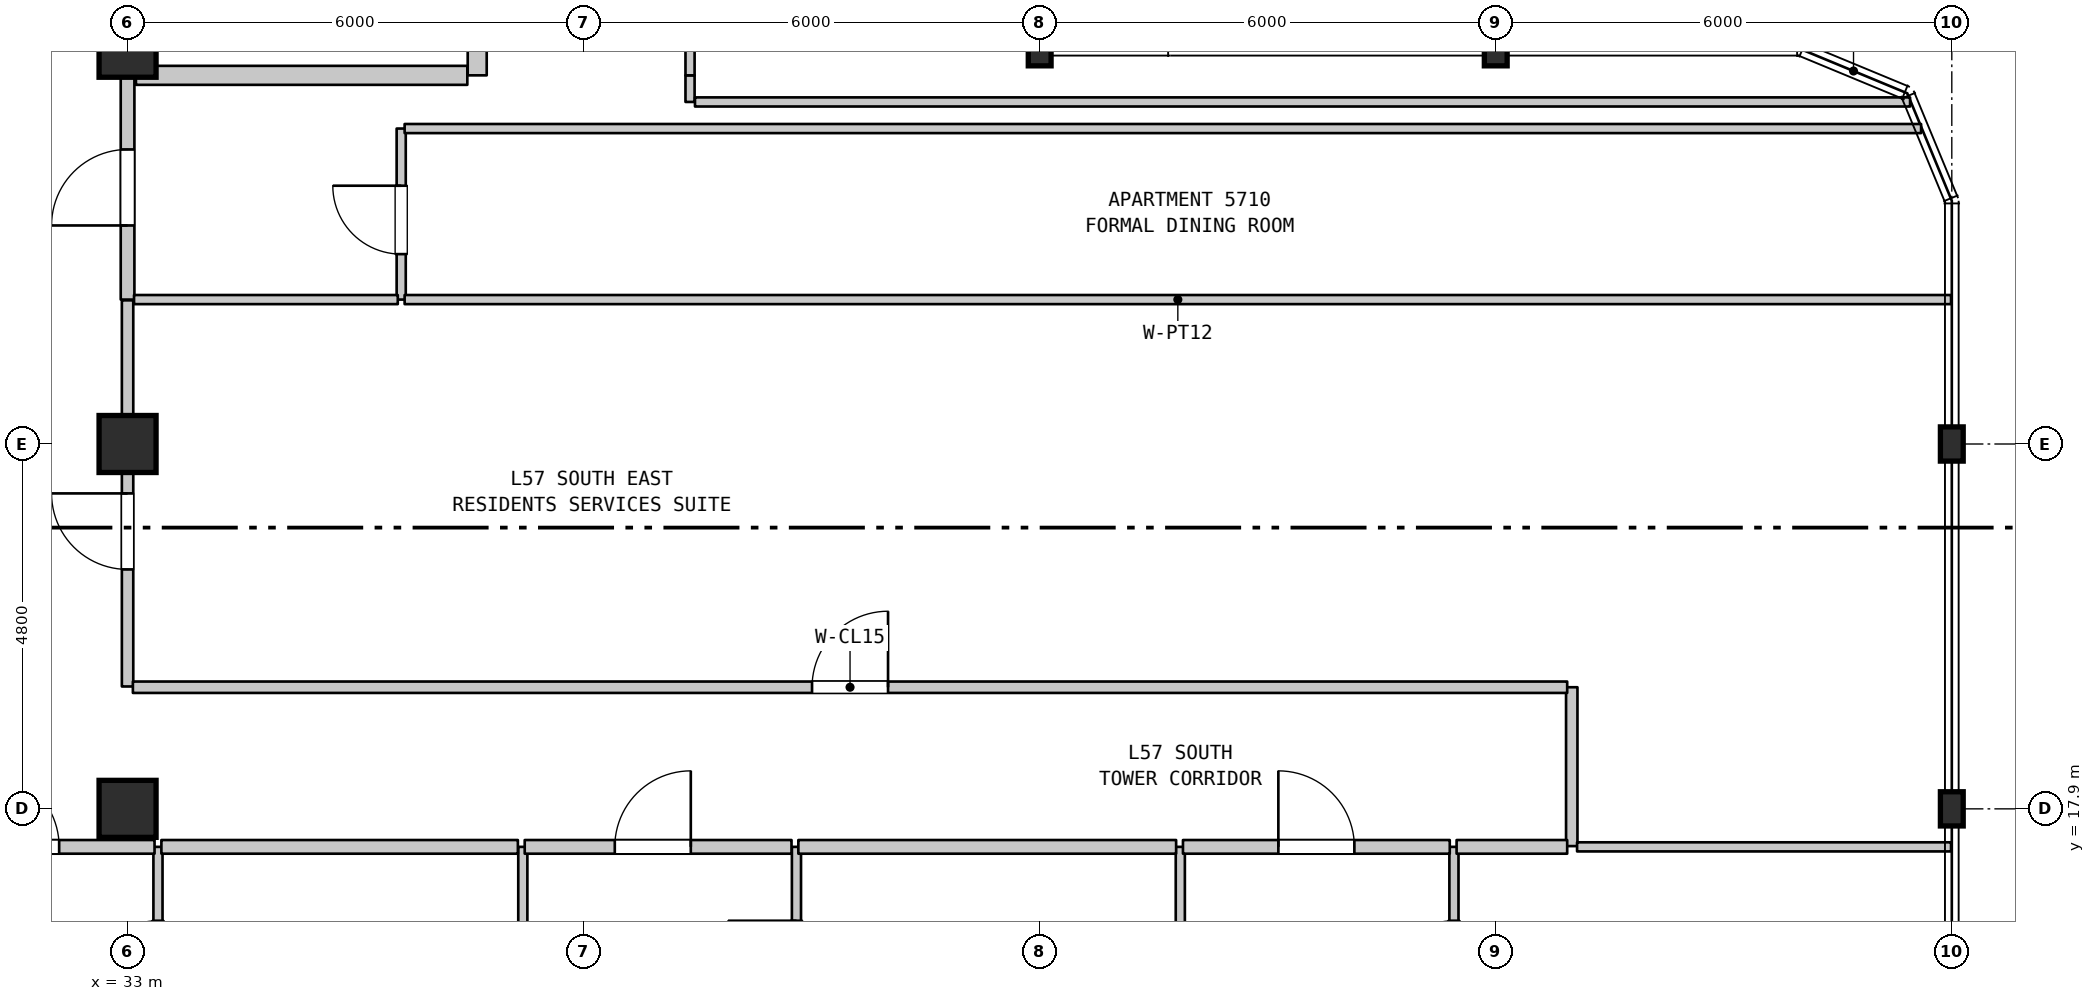
"""IFC4 building model, lengths in metres.
Left out: names, types, materials, properties, quantities, classifications, styles, units other than length and angle.
Written with IfcOpenShell. Run it as: python <this file> out.ifc"""

import sys

from ifc_helpers import new_model, si_unit, direction, frame, frame_2d, origin, origin_2d, place, context, subcontext, project, spatial, rectangle, i_section, extrude, element, fill, save


model = new_model("IFC4")
c1 = context("Model", 3, precision=1e-05, world=origin(), true_north=direction((0.0, 1.0)))
c2 = subcontext(c1, "Body", "Model", "MODEL_VIEW")
j1 = project(units=[si_unit("LENGTHUNIT", "METRE"), si_unit("PLANEANGLEUNIT", "RADIAN")], contexts=[c1])
p1 = place(None, origin())
s1 = spatial("IfcSite", under=j1, at=p1, CompositionType="ELEMENT")
p2 = place(p1, origin())
s2 = spatial("IfcBuilding", under=s1, at=p2, CompositionType="ELEMENT")
p3 = place(p2, frame((0.0, 0.0, 230.2)))
s3 = spatial("IfcBuildingStorey", under=s2, at=p3, CompositionType="ELEMENT", Elevation=230.2)
for number, where, z_axis, x_axis in (
    (1, (33.0, 17.9, 0.0), (0.0, 0.0, 1.0), (1.0, 0.0, 0.0)),
    (2, (33.0, 22.7, 0.0), (0.0, 0.0, 1.0), (1.0, 0.0, 0.0)),
    (3, (33.0, 27.9, 0.0), (0.0, 0.0, 1.0), (1.0, 0.0, 0.0)),
):
    element("IfcColumn", number, at=place(p3, frame(where, z_axis=z_axis, x_axis=x_axis)), inside=s3, PredefinedType="COLUMN", context=c2, shape_type="SweptSolid", body=[
        extrude(rectangle(XDim=0.75, YDim=0.75, at=origin_2d()), origin(), (0.0, 0.0, 1.0), 3.7),
    ])
for number, where, z_axis, x_axis in (
    (4, (45.0, 27.9, 0.0), (0.0, 0.0, 1.0), (1.0, 0.0, 0.0)),
    (5, (51.0, 27.9, 0.0), (0.0, 0.0, 1.0), (1.0, 0.0, 0.0)),
    (6, (57.0, 17.9, 0.0), (0.0, 0.0, 1.0), (1.0, 0.0, 0.0)),
    (7, (57.0, 22.7, 0.0), (0.0, 0.0, 1.0), (1.0, 0.0, 0.0)),
):
    element("IfcColumn", number, at=place(p3, frame(where, z_axis=z_axis, x_axis=x_axis)), inside=s3, PredefinedType="COLUMN", context=c2, shape_type="SweptSolid", body=[
        extrude(i_section(OverallWidth=0.3, OverallDepth=0.45, WebThickness=0.014, FlangeThickness=0.026, FilletRadius=0.027, at=origin_2d()), origin(), (0.0, 0.0, 1.0), 3.7),
    ])
p4 = place(p3, frame((33.0, 19.51, 0.0), z_axis=(0.0, 0.0, 1.0), x_axis=(0.0, 1.0, 0.0)))
e8 = element("IfcWall", 8, at=p4, inside=s3, PredefinedType="STANDARD", context=c2, shape_type="SweptSolid", body=[
    extrude(rectangle(XDim=5.08, YDim=0.15, at=frame_2d((2.54, 0.0))), origin(), (0.0, 0.0, 1.0), 2.99),
])
p5 = place(p4, frame((1.54, 0.0, 0.0)))
e9 = element("IfcOpeningElement", 9, at=p5, cuts=e8, PredefinedType="OPENING", context=c2, shape_type="SweptSolid", body=[
    extrude(rectangle(XDim=1.0, YDim=2.15, at=frame_2d((0.5, 1.075))), frame((0.0, 0.085, 0.0), z_axis=(0.0, -1.0, 0.0), x_axis=(1.0, 0.0, 0.0)), (0.0, 0.0, 1.0), 0.17),
])
p6 = place(p3, frame((33.0, 24.6, 0.0), z_axis=(0.0, 0.0, 1.0), x_axis=(0.0, 1.0, 0.0)))
e10 = element("IfcWall", 10, at=p6, inside=s3, PredefinedType="STANDARD", context=c2, shape_type="SweptSolid", body=[
    extrude(rectangle(XDim=2.95, YDim=0.18, at=frame_2d((1.475, 0.0))), origin(), (0.0, 0.0, 1.0), 2.99),
])
p7 = place(p6, frame((0.975, 0.0, 0.0)))
e11 = element("IfcOpeningElement", 11, at=p7, cuts=e10, PredefinedType="OPENING", context=c2, shape_type="SweptSolid", body=[
    extrude(rectangle(XDim=1.0, YDim=2.15, at=frame_2d((0.5, 1.075))), frame((0.0, 0.1, 0.0), z_axis=(0.0, -1.0, 0.0), x_axis=(1.0, 0.0, 0.0)), (0.0, 0.0, 1.0), 0.2),
])
p8 = place(p3, frame((33.0, 27.55, 0.0), z_axis=(0.0, 0.0, 1.0), x_axis=(0.0, 1.0, 0.0)))
e12 = element("IfcWall", 12, at=p8, inside=s3, PredefinedType="STANDARD", context=c2, shape_type="SweptSolid", body=[
    extrude(rectangle(XDim=4.636, YDim=0.25, at=frame_2d((2.318, 0.0))), origin(), (0.0, 0.0, 1.0), 2.89),
])
p9 = place(p3, frame((33.4, 14.7, 0.0), z_axis=(0.0, 0.0, 1.0), x_axis=(0.0, 1.0, 0.0)))
e13 = element("IfcWall", 13, at=p9, inside=s3, PredefinedType="PARTITIONING", context=c2, shape_type="SweptSolid", body=[
    extrude(rectangle(XDim=2.7, YDim=0.12, at=frame_2d((1.35, 0.0))), origin(), (0.0, 0.0, 1.0), 3.39),
])
p10 = place(p9, frame((0.828, 0.0, 0.0)))
e14 = element("IfcOpeningElement", 14, at=p10, cuts=e13, PredefinedType="OPENING", context=c2, shape_type="SweptSolid", body=[
    extrude(rectangle(XDim=0.9, YDim=2.1, at=frame_2d((0.45, 1.05))), frame((0.0, 0.07, 0.0), z_axis=(0.0, -1.0, 0.0), x_axis=(1.0, 0.0, 0.0)), (0.0, 0.0, 1.0), 0.14),
])
p11 = place(p3, frame((36.6, 24.6, 0.0), z_axis=(0.0, 0.0, 1.0), x_axis=(0.0, 1.0, 0.0)))
e15 = element("IfcWall", 15, at=p11, inside=s3, PredefinedType="PARTITIONING", context=c2, shape_type="SweptSolid", body=[
    extrude(rectangle(XDim=2.25, YDim=0.12, at=frame_2d((1.125, 0.0))), origin(), (0.0, 0.0, 1.0), 3.39),
])
p12 = place(p11, frame((0.598, 0.0, 0.0)))
e16 = element("IfcOpeningElement", 16, at=p12, cuts=e15, PredefinedType="OPENING", context=c2, shape_type="SweptSolid", body=[
    extrude(rectangle(XDim=0.9, YDim=2.15, at=frame_2d((0.45, 1.075))), frame((0.0, 0.07, 0.0), z_axis=(0.0, -1.0, 0.0), x_axis=(1.0, 0.0, 0.0)), (0.0, 0.0, 1.0), 0.14),
])
p13 = place(p3, frame((37.6, 27.55, 0.0), z_axis=(0.0, 0.0, 1.0), x_axis=(0.0, 1.0, 0.0)))
e17 = element("IfcWall", 17, at=p13, inside=s3, PredefinedType="STANDARD", context=c2, shape_type="SweptSolid", body=[
    extrude(rectangle(XDim=4.636, YDim=0.25, at=frame_2d((2.318, 0.0))), origin(), (0.0, 0.0, 1.0), 3.39),
])
p14 = place(p13, frame((1.843, 0.0, 0.0)))
e18 = element("IfcOpeningElement", 18, at=p14, cuts=e17, PredefinedType="OPENING", context=c2, shape_type="SweptSolid", body=[
    extrude(rectangle(XDim=0.95, YDim=2.15, at=frame_2d((0.475, 1.075))), frame((0.0, 0.135, 0.0), z_axis=(0.0, -1.0, 0.0), x_axis=(1.0, 0.0, 0.0)), (0.0, 0.0, 1.0), 0.27),
])
p15 = place(p3, frame((38.2, 14.7, 0.0), z_axis=(0.0, 0.0, 1.0), x_axis=(0.0, 1.0, 0.0)))
e19 = element("IfcWall", 19, at=p15, inside=s3, PredefinedType="PARTITIONING", context=c2, shape_type="SweptSolid", body=[
    extrude(rectangle(XDim=2.7, YDim=0.12, at=frame_2d((1.35, 0.0))), origin(), (0.0, 0.0, 1.0), 3.39),
])
p16 = place(p3, frame((40.4, 27.2, 0.0), z_axis=(0.0, 0.0, 1.0), x_axis=(0.0, 1.0, 0.0)))
e20 = element("IfcWall", 20, at=p16, inside=s3, PredefinedType="PARTITIONING", context=c2, shape_type="SweptSolid", body=[
    extrude(rectangle(XDim=0.35, YDim=0.12, at=frame_2d((0.175, 0.0))), origin(), (0.0, 0.0, 1.0), 3.39),
])
p17 = place(p3, frame((40.4, 27.55, 0.0), z_axis=(0.0, 0.0, 1.0), x_axis=(0.0, 1.0, 0.0)))
e21 = element("IfcWall", 21, at=p17, inside=s3, PredefinedType="PARTITIONING", context=c2, shape_type="SweptSolid", body=[
    extrude(rectangle(XDim=12.2, YDim=0.12, at=frame_2d((6.1, 0.0))), origin(), (0.0, 0.0, 1.0), 3.39),
])
p18 = place(p17, frame((1.758, 0.0, 0.0)))
e22 = element("IfcOpeningElement", 22, at=p18, cuts=e21, PredefinedType="OPENING", context=c2, shape_type="SweptSolid", body=[
    extrude(rectangle(XDim=0.9, YDim=2.15, at=frame_2d((0.45, 1.075))), frame((0.0, 0.07, 0.0), z_axis=(0.0, -1.0, 0.0), x_axis=(1.0, 0.0, 0.0)), (0.0, 0.0, 1.0), 0.14),
])
p19 = place(p17, frame((5.579, 0.0, 0.0)))
e23 = element("IfcOpeningElement", 23, at=p19, cuts=e21, PredefinedType="OPENING", context=c2, shape_type="SweptSolid", body=[
    extrude(rectangle(XDim=0.9, YDim=2.15, at=frame_2d((0.45, 1.075))), frame((0.0, 0.07, 0.0), z_axis=(0.0, -1.0, 0.0), x_axis=(1.0, 0.0, 0.0)), (0.0, 0.0, 1.0), 0.14),
])
p20 = place(p17, frame((9.541, 0.0, 0.0)))
e24 = element("IfcOpeningElement", 24, at=p20, cuts=e21, PredefinedType="OPENING", context=c2, shape_type="SweptSolid", body=[
    extrude(rectangle(XDim=0.9, YDim=2.15, at=frame_2d((0.45, 1.075))), frame((0.0, 0.07, 0.0), z_axis=(0.0, -1.0, 0.0), x_axis=(1.0, 0.0, 0.0)), (0.0, 0.0, 1.0), 0.14),
])
p21 = place(p3, frame((41.8, 14.7, 0.0), z_axis=(0.0, 0.0, 1.0), x_axis=(0.0, 1.0, 0.0)))
e25 = element("IfcWall", 25, at=p21, inside=s3, PredefinedType="PARTITIONING", context=c2, shape_type="SweptSolid", body=[
    extrude(rectangle(XDim=2.7, YDim=0.12, at=frame_2d((1.35, 0.0))), origin(), (0.0, 0.0, 1.0), 3.39),
])
p22 = place(p21, frame((0.828, 0.0, 0.0)))
e26 = element("IfcOpeningElement", 26, at=p22, cuts=e25, PredefinedType="OPENING", context=c2, shape_type="SweptSolid", body=[
    extrude(rectangle(XDim=0.9, YDim=2.1, at=frame_2d((0.45, 1.05))), frame((0.0, 0.07, 0.0), z_axis=(0.0, -1.0, 0.0), x_axis=(1.0, 0.0, 0.0)), (0.0, 0.0, 1.0), 0.14),
])
p23 = place(p3, frame((46.85, 14.7, 0.0), z_axis=(0.0, 0.0, 1.0), x_axis=(0.0, 1.0, 0.0)))
e27 = element("IfcWall", 27, at=p23, inside=s3, PredefinedType="PARTITIONING", context=c2, shape_type="SweptSolid", body=[
    extrude(rectangle(XDim=2.7, YDim=0.12, at=frame_2d((1.35, 0.0))), origin(), (0.0, 0.0, 1.0), 3.39),
])
p24 = place(p3, frame((50.45, 14.7, 0.0), z_axis=(0.0, 0.0, 1.0), x_axis=(0.0, 1.0, 0.0)))
e28 = element("IfcWall", 28, at=p24, inside=s3, PredefinedType="PARTITIONING", context=c2, shape_type="SweptSolid", body=[
    extrude(rectangle(XDim=2.7, YDim=0.12, at=frame_2d((1.35, 0.0))), origin(), (0.0, 0.0, 1.0), 3.39),
])
p25 = place(p24, frame((0.828, 0.0, 0.0)))
e29 = element("IfcOpeningElement", 29, at=p25, cuts=e28, PredefinedType="OPENING", context=c2, shape_type="SweptSolid", body=[
    extrude(rectangle(XDim=0.9, YDim=2.1, at=frame_2d((0.45, 1.05))), frame((0.0, 0.07, 0.0), z_axis=(0.0, -1.0, 0.0), x_axis=(1.0, 0.0, 0.0)), (0.0, 0.0, 1.0), 0.14),
])
p26 = place(p3, frame((52.0, 17.41, 0.0), z_axis=(0.0, 0.0, 1.0), x_axis=(0.0, 1.0, 0.0)))
e30 = element("IfcWall", 30, at=p26, inside=s3, PredefinedType="STANDARD", context=c2, shape_type="SweptSolid", body=[
    extrude(rectangle(XDim=2.09, YDim=0.15, at=frame_2d((1.045, 0.0))), origin(), (0.0, 0.0, 1.0), 3.39),
])
p27 = place(p3, frame((29.845, 17.4, 0.0), z_axis=(0.0, 0.0, 1.0), x_axis=(1.0, 0.0, 0.0)))
e31 = element("IfcWall", 31, at=p27, inside=s3, PredefinedType="STANDARD", context=c2, shape_type="SweptSolid", body=[
    extrude(rectangle(XDim=3.51, YDim=0.18, at=frame_2d((1.755, 0.0))), origin(), (0.0, 0.0, 1.0), 3.39),
])
p28 = place(p27, frame((1.255, 0.0, 0.0)))
e32 = element("IfcOpeningElement", 32, at=p28, cuts=e31, PredefinedType="OPENING", context=c2, shape_type="SweptSolid", body=[
    extrude(rectangle(XDim=1.0, YDim=2.15, at=frame_2d((0.5, 1.075))), frame((0.0, 0.1, 0.0), z_axis=(0.0, -1.0, 0.0), x_axis=(1.0, 0.0, 0.0)), (0.0, 0.0, 1.0), 0.2),
])
p29 = place(p3, frame((33.445, 17.4, 0.0), z_axis=(0.0, 0.0, 1.0), x_axis=(1.0, 0.0, 0.0)))
e33 = element("IfcWall", 33, at=p29, inside=s3, PredefinedType="STANDARD", context=c2, shape_type="SweptSolid", body=[
    extrude(rectangle(XDim=4.69, YDim=0.18, at=frame_2d((2.345, 0.0))), origin(), (0.0, 0.0, 1.0), 3.39),
])
p30 = place(p3, frame((38.225, 17.4, 0.0), z_axis=(0.0, 0.0, 1.0), x_axis=(1.0, 0.0, 0.0)))
e34 = element("IfcWall", 34, at=p30, inside=s3, PredefinedType="STANDARD", context=c2, shape_type="SweptSolid", body=[
    extrude(rectangle(XDim=3.51, YDim=0.18, at=frame_2d((1.755, 0.0))), origin(), (0.0, 0.0, 1.0), 3.39),
])
p31 = place(p30, frame((1.185, 0.0, 0.0)))
e35 = element("IfcOpeningElement", 35, at=p31, cuts=e34, PredefinedType="OPENING", context=c2, shape_type="SweptSolid", body=[
    extrude(rectangle(XDim=1.0, YDim=2.15, at=frame_2d((0.5, 1.075))), frame((0.0, 0.1, 0.0), z_axis=(0.0, -1.0, 0.0), x_axis=(1.0, 0.0, 0.0)), (0.0, 0.0, 1.0), 0.2),
])
p32 = place(p3, frame((41.825, 17.4, 0.0), z_axis=(0.0, 0.0, 1.0), x_axis=(1.0, 0.0, 0.0)))
e36 = element("IfcWall", 36, at=p32, inside=s3, PredefinedType="STANDARD", context=c2, shape_type="SweptSolid", body=[
    extrude(rectangle(XDim=4.97, YDim=0.18, at=frame_2d((2.485, 0.0))), origin(), (0.0, 0.0, 1.0), 3.39),
])
p33 = place(p3, frame((46.885, 17.4, 0.0), z_axis=(0.0, 0.0, 1.0), x_axis=(1.0, 0.0, 0.0)))
e37 = element("IfcWall", 37, at=p33, inside=s3, PredefinedType="STANDARD", context=c2, shape_type="SweptSolid", body=[
    extrude(rectangle(XDim=3.51, YDim=0.18, at=frame_2d((1.755, 0.0))), origin(), (0.0, 0.0, 1.0), 3.39),
])
p34 = place(p33, frame((1.255, 0.0, 0.0)))
e38 = element("IfcOpeningElement", 38, at=p34, cuts=e37, PredefinedType="OPENING", context=c2, shape_type="SweptSolid", body=[
    extrude(rectangle(XDim=1.0, YDim=2.15, at=frame_2d((0.5, 1.075))), frame((0.0, 0.1, 0.0), z_axis=(0.0, -1.0, 0.0), x_axis=(1.0, 0.0, 0.0)), (0.0, 0.0, 1.0), 0.2),
])
p35 = place(p3, frame((50.485, 17.4, 0.0), z_axis=(0.0, 0.0, 1.0), x_axis=(1.0, 0.0, 0.0)))
e39 = element("IfcWall", 39, at=p35, inside=s3, PredefinedType="STANDARD", context=c2, shape_type="SweptSolid", body=[
    extrude(rectangle(XDim=1.455, YDim=0.18, at=frame_2d((0.728, 0.0))), origin(), (0.0, 0.0, 1.0), 3.39),
])
p36 = place(p3, frame((52.07, 17.4, 0.0), z_axis=(0.0, 0.0, 1.0), x_axis=(1.0, 0.0, 0.0)))
e40 = element("IfcWall", 40, at=p36, inside=s3, PredefinedType="PARTITIONING", context=c2, shape_type="SweptSolid", body=[
    extrude(rectangle(XDim=4.92, YDim=0.12, at=frame_2d((2.46, 0.0))), origin(), (0.0, 0.0, 1.0), 3.39),
])
p37 = place(p3, frame((33.07, 19.5, 0.0), z_axis=(0.0, 0.0, 1.0), x_axis=(1.0, 0.0, 0.0)))
e41 = element("IfcWall", 41, at=p37, inside=s3, PredefinedType="STANDARD", context=c2, shape_type="SweptSolid", body=[
    extrude(rectangle(XDim=18.87, YDim=0.15, at=frame_2d((9.435, 0.0))), origin(), (0.0, 0.0, 1.0), 3.39),
])
p38 = place(p37, frame((8.935, 0.0, 0.0)))
e42 = element("IfcOpeningElement", 42, at=p38, cuts=e41, PredefinedType="OPENING", context=c2, shape_type="SweptSolid", body=[
    extrude(rectangle(XDim=1.0, YDim=2.15, at=frame_2d((0.5, 1.075))), frame((0.0, 0.085, 0.0), z_axis=(0.0, -1.0, 0.0), x_axis=(1.0, 0.0, 0.0)), (0.0, 0.0, 1.0), 0.17),
])
p39 = place(p3, frame((33.085, 24.6, 0.0), z_axis=(0.0, 0.0, 1.0), x_axis=(1.0, 0.0, 0.0)))
e43 = element("IfcWall", 43, at=p39, inside=s3, PredefinedType="PARTITIONING", context=c2, shape_type="SweptSolid", body=[
    extrude(rectangle(XDim=3.47, YDim=0.12, at=frame_2d((1.735, 0.0))), origin(), (0.0, 0.0, 1.0), 3.39),
])
p40 = place(p3, frame((36.645, 24.6, 0.0), z_axis=(0.0, 0.0, 1.0), x_axis=(1.0, 0.0, 0.0)))
e44 = element("IfcWall", 44, at=p40, inside=s3, PredefinedType="PARTITIONING", context=c2, shape_type="SweptSolid", body=[
    extrude(rectangle(XDim=20.345, YDim=0.12, at=frame_2d((10.172, 0.0))), origin(), (0.0, 0.0, 1.0), 3.39),
])
p41 = place(p3, frame((36.645, 26.85, 0.0), z_axis=(0.0, 0.0, 1.0), x_axis=(1.0, 0.0, 0.0)))
e45 = element("IfcWall", 45, at=p41, inside=s3, PredefinedType="PARTITIONING", context=c2, shape_type="SweptSolid", body=[
    extrude(rectangle(XDim=19.951, YDim=0.12, at=frame_2d((9.976, 0.0))), origin(), (0.0, 0.0, 1.0), 3.39),
])
p42 = place(p3, frame((40.465, 27.2, 0.0), z_axis=(0.0, 0.0, 1.0), x_axis=(1.0, 0.0, 0.0)))
e46 = element("IfcWall", 46, at=p42, inside=s3, PredefinedType="PARTITIONING", context=c2, shape_type="SweptSolid", body=[
    extrude(rectangle(XDim=15.986, YDim=0.12, at=frame_2d((7.993, 0.0))), origin(), (0.0, 0.0, 1.0), 3.39),
])
p43 = place(p3, frame((33.11, 27.55, 0.0), z_axis=(0.0, 0.0, 1.0), x_axis=(1.0, 0.0, 0.0)))
e47 = element("IfcWall", 47, at=p43, inside=s3, PredefinedType="STANDARD", context=c2, shape_type="SweptSolid", body=[
    extrude(rectangle(XDim=4.36, YDim=0.25, at=frame_2d((2.18, 0.0))), origin(), (0.0, 0.0, 1.0), 3.39),
])
p44 = place(p5, origin())
e48 = element("IfcDoor", 48, at=p44, inside=s3, OperationType="SINGLE_SWING_RIGHT", PredefinedType="DOOR", context=c2, shape_type="SweptSolid", body=[
    extrude(rectangle(XDim=1.0, YDim=2.15, at=frame_2d((0.5, 1.075))), frame((0.0, 0.025, 0.0), z_axis=(0.0, -1.0, 0.0), x_axis=(1.0, 0.0, 0.0)), (0.0, 0.0, 1.0), 0.05),
])
fill(e9, e48)
p45 = place(p7, origin())
e49 = element("IfcDoor", 49, at=p45, inside=s3, OperationType="SINGLE_SWING_LEFT", PredefinedType="DOOR", context=c2, shape_type="SweptSolid", body=[
    extrude(rectangle(XDim=1.0, YDim=2.15, at=frame_2d((0.5, 1.075))), frame((0.0, 0.025, 0.0), z_axis=(0.0, -1.0, 0.0), x_axis=(1.0, 0.0, 0.0)), (0.0, 0.0, 1.0), 0.05),
])
fill(e11, e49)
p46 = place(p10, origin())
e50 = element("IfcDoor", 50, at=p46, inside=s3, OperationType="SINGLE_SWING_LEFT", PredefinedType="DOOR", context=c2, shape_type="SweptSolid", body=[
    extrude(rectangle(XDim=0.9, YDim=2.1, at=frame_2d((0.45, 1.05))), frame((0.0, 0.025, 0.0), z_axis=(0.0, -1.0, 0.0), x_axis=(1.0, 0.0, 0.0)), (0.0, 0.0, 1.0), 0.05),
])
fill(e14, e50)
p47 = place(p12, origin())
e51 = element("IfcDoor", 51, at=p47, inside=s3, OperationType="SINGLE_SWING_RIGHT", PredefinedType="DOOR", context=c2, shape_type="SweptSolid", body=[
    extrude(rectangle(XDim=0.9, YDim=2.15, at=frame_2d((0.45, 1.075))), frame((0.0, 0.025, 0.0), z_axis=(0.0, -1.0, 0.0), x_axis=(1.0, 0.0, 0.0)), (0.0, 0.0, 1.0), 0.05),
])
fill(e16, e51)
p48 = place(p22, origin())
e52 = element("IfcDoor", 52, at=p48, inside=s3, OperationType="SINGLE_SWING_RIGHT", PredefinedType="DOOR", context=c2, shape_type="SweptSolid", body=[
    extrude(rectangle(XDim=0.9, YDim=2.1, at=frame_2d((0.45, 1.05))), frame((0.0, 0.025, 0.0), z_axis=(0.0, -1.0, 0.0), x_axis=(1.0, 0.0, 0.0)), (0.0, 0.0, 1.0), 0.05),
])
fill(e26, e52)
p49 = place(p25, origin())
e53 = element("IfcDoor", 53, at=p49, inside=s3, OperationType="SINGLE_SWING_LEFT", PredefinedType="DOOR", context=c2, shape_type="SweptSolid", body=[
    extrude(rectangle(XDim=0.9, YDim=2.1, at=frame_2d((0.45, 1.05))), frame((0.0, 0.025, 0.0), z_axis=(0.0, -1.0, 0.0), x_axis=(1.0, 0.0, 0.0)), (0.0, 0.0, 1.0), 0.05),
])
fill(e29, e53)
p50 = place(p28, origin())
e54 = element("IfcDoor", 54, at=p50, inside=s3, OperationType="SINGLE_SWING_LEFT", PredefinedType="DOOR", context=c2, shape_type="SweptSolid", body=[
    extrude(rectangle(XDim=1.0, YDim=2.15, at=frame_2d((0.5, 1.075))), frame((0.0, 0.025, 0.0), z_axis=(0.0, -1.0, 0.0), x_axis=(1.0, 0.0, 0.0)), (0.0, 0.0, 1.0), 0.05),
])
fill(e32, e54)
p51 = place(p31, origin())
e55 = element("IfcDoor", 55, at=p51, inside=s3, OperationType="SINGLE_SWING_RIGHT", PredefinedType="DOOR", context=c2, shape_type="SweptSolid", body=[
    extrude(rectangle(XDim=1.0, YDim=2.15, at=frame_2d((0.5, 1.075))), frame((0.0, 0.025, 0.0), z_axis=(0.0, -1.0, 0.0), x_axis=(1.0, 0.0, 0.0)), (0.0, 0.0, 1.0), 0.05),
])
fill(e35, e55)
p52 = place(p34, origin())
e56 = element("IfcDoor", 56, at=p52, inside=s3, OperationType="SINGLE_SWING_LEFT", PredefinedType="DOOR", context=c2, shape_type="SweptSolid", body=[
    extrude(rectangle(XDim=1.0, YDim=2.15, at=frame_2d((0.5, 1.075))), frame((0.0, 0.025, 0.0), z_axis=(0.0, -1.0, 0.0), x_axis=(1.0, 0.0, 0.0)), (0.0, 0.0, 1.0), 0.05),
])
fill(e38, e56)
p53 = place(p38, origin())
e57 = element("IfcDoor", 57, at=p53, inside=s3, OperationType="SINGLE_SWING_RIGHT", PredefinedType="DOOR", context=c2, shape_type="SweptSolid", body=[
    extrude(rectangle(XDim=1.0, YDim=2.15, at=frame_2d((0.5, 1.075))), frame((0.0, 0.025, 0.0), z_axis=(0.0, -1.0, 0.0), x_axis=(1.0, 0.0, 0.0)), (0.0, 0.0, 1.0), 0.05),
])
fill(e42, e57)
save(model, sys.argv[1])
